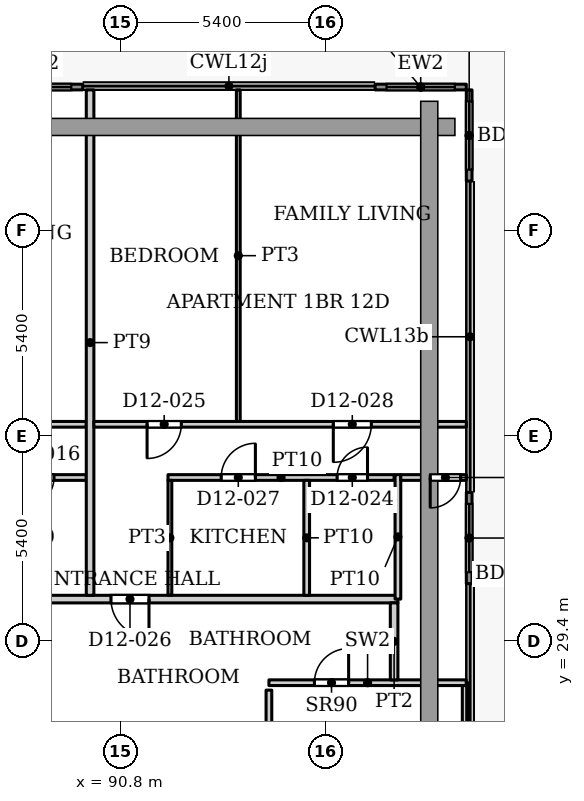
"""IFC4 building model, lengths in metres.
Left out: names, types, materials, properties, quantities, classifications, styles, units other than length and angle.
Written with IfcOpenShell. Run it as: python <this file> out.ifc"""

import sys

from ifc_helpers import new_model, si_unit, direction, frame, frame_2d, origin, place, context, subcontext, project, spatial, rectangle, extrude, source, transform, mapped, element, fill, save


model = new_model("IFC4")
c1 = context("Model", 3, precision=1e-05, world=origin(), true_north=direction((0.0, 1.0)))
c2 = subcontext(c1, "Body", "Model", "MODEL_VIEW")
j1 = project(units=[si_unit("LENGTHUNIT", "METRE"), si_unit("PLANEANGLEUNIT", "RADIAN")], contexts=[c1])
p1 = place(None, origin())
s1 = spatial("IfcSite", under=j1, at=p1, CompositionType="ELEMENT")
p2 = place(p1, origin())
s2 = spatial("IfcBuilding", under=s1, at=p2, CompositionType="ELEMENT")
p3 = place(p2, frame((0.0, 0.0, 53.9)))
s3 = spatial("IfcBuildingStorey", under=s2, at=p3, CompositionType="ELEMENT", Elevation=53.9)
p4 = place(p3, frame((87.406, 43.975, 0.0), z_axis=(0.0, 0.0, 1.0), x_axis=(1.0, 0.0, 0.0)))
e1 = element("IfcWall", 1, at=p4, inside=s3, PredefinedType="SOLIDWALL", context=c2, shape_type="SweptSolid", body=[
    extrude(rectangle(XDim=2.4, YDim=0.15, at=frame_2d((1.2, 0.0))), origin(), (0.0, 0.0, 1.0), 3.75),
])
p5 = place(p4, frame((0.3, 0.0, 0.0)))
e2 = element("IfcOpeningElement", 2, at=p5, cuts=e1, PredefinedType="OPENING", context=c2, shape_type="SweptSolid", body=[
    extrude(rectangle(XDim=1.8, YDim=2.4, at=frame_2d((0.9, 1.2))), frame((0.0, 0.085, 0.0), z_axis=(0.0, -1.0, 0.0), x_axis=(1.0, 0.0, 0.0)), (0.0, 0.0, 1.0), 0.17),
])
p6 = place(p3, frame((97.5, 43.975, 0.0), z_axis=(0.0, 0.0, 1.0), x_axis=(1.0, 0.0, 0.0)))
e3 = element("IfcWall", 3, at=p6, inside=s3, PredefinedType="SOLIDWALL", context=c2, shape_type="SweptSolid", body=[
    extrude(rectangle(XDim=2.4, YDim=0.15, at=frame_2d((1.2, 0.0))), origin(), (0.0, 0.0, 1.0), 3.75),
])
p7 = place(p6, frame((0.3, 0.0, 0.0)))
e4 = element("IfcOpeningElement", 4, at=p7, cuts=e3, PredefinedType="OPENING", context=c2, shape_type="SweptSolid", body=[
    extrude(rectangle(XDim=1.8, YDim=2.4, at=frame_2d((0.9, 1.2))), frame((0.0, 0.085, 0.0), z_axis=(0.0, -1.0, 0.0), x_axis=(1.0, 0.0, 0.0)), (0.0, 0.0, 1.0), 0.17),
])
p8 = place(p3, frame((99.975, 43.9, 0.0), z_axis=(0.0, 0.0, 1.0), x_axis=(0.0, -1.0, 0.0)))
e5 = element("IfcWall", 5, at=p8, inside=s3, PredefinedType="SOLIDWALL", context=c2, shape_type="SweptSolid", body=[
    extrude(rectangle(XDim=2.4, YDim=0.15, at=frame_2d((1.2, 0.0))), origin(), (0.0, 0.0, 1.0), 3.75),
])
p9 = place(p8, frame((0.3, 0.0, 0.0)))
e6 = element("IfcOpeningElement", 6, at=p9, cuts=e5, PredefinedType="OPENING", context=c2, shape_type="SweptSolid", body=[
    extrude(rectangle(XDim=1.8, YDim=2.4, at=frame_2d((0.9, 1.2))), frame((0.0, 0.085, 0.0), z_axis=(0.0, -1.0, 0.0), x_axis=(1.0, 0.0, 0.0)), (0.0, 0.0, 1.0), 0.17),
])
p10 = place(p3, frame((99.975, 33.307, 0.0), z_axis=(0.0, 0.0, 1.0), x_axis=(0.0, -1.0, 0.0)))
e7 = element("IfcWall", 7, at=p10, inside=s3, PredefinedType="SOLIDWALL", context=c2, shape_type="SweptSolid", body=[
    extrude(rectangle(XDim=2.4, YDim=0.15, at=frame_2d((1.2, 0.0))), origin(), (0.0, 0.0, 1.0), 3.75),
])
p11 = place(p10, frame((0.3, 0.0, 0.0)))
e8 = element("IfcOpeningElement", 8, at=p11, cuts=e7, PredefinedType="OPENING", context=c2, shape_type="SweptSolid", body=[
    extrude(rectangle(XDim=1.8, YDim=2.4, at=frame_2d((0.9, 1.2))), frame((0.0, 0.085, 0.0), z_axis=(0.0, -1.0, 0.0), x_axis=(1.0, 0.0, 0.0)), (0.0, 0.0, 1.0), 0.17),
])
p12 = place(p3, frame((99.87, 21.015, 0.0), z_axis=(0.0, 0.0, 1.0), x_axis=(0.0, 1.0, 0.0)))
e9 = element("IfcWall", 9, at=p12, inside=s3, PredefinedType="PARTITIONING", context=c2, shape_type="SweptSolid", body=[
    extrude(rectangle(XDim=7.285, YDim=0.15, at=frame_2d((3.643, 0.0))), origin(), (0.0, 0.0, 1.0), 3.9),
])
p13 = place(p3, frame((94.706, 28.3, 0.0), z_axis=(0.0, 0.0, 1.0), x_axis=(1.0, 0.0, 0.0)))
e10 = element("IfcWall", 10, at=p13, inside=s3, PredefinedType="PARTITIONING", context=c2, shape_type="SweptSolid", body=[
    extrude(rectangle(XDim=5.192, YDim=0.15, at=frame_2d((2.596, 0.0))), origin(), (0.0, 0.0, 1.0), 3.9),
])
p14 = place(p13, frame((1.197, 0.0, 0.0)))
e11 = element("IfcOpeningElement", 11, at=p14, cuts=e10, PredefinedType="OPENING", context=c2, shape_type="SweptSolid", body=[
    extrude(rectangle(XDim=0.9, YDim=2.2, at=frame_2d((0.45, 1.1))), frame((0.0, 0.085, 0.0), z_axis=(0.0, -1.0, 0.0), x_axis=(1.0, 0.0, 0.0)), (0.0, 0.0, 1.0), 0.17),
])
p15 = place(p3, frame((94.706, 21.287, 0.0), z_axis=(0.0, 0.0, 1.0), x_axis=(0.0, 1.0, 0.0)))
e12 = element("IfcWall", 12, at=p15, inside=s3, PredefinedType="PARTITIONING", context=c2, shape_type="SweptSolid", body=[
    extrude(rectangle(XDim=6.818, YDim=0.15, at=frame_2d((3.409, 0.0))), origin(), (0.0, 0.0, 1.0), 3.9),
])
p16 = place(p3, frame((55.9, 30.5, 0.0), z_axis=(0.0, 0.0, 1.0), x_axis=(1.0, 0.0, 0.0)))
e13 = element("IfcWall", 13, at=p16, inside=s3, PredefinedType="PARTITIONING", context=c2, shape_type="SweptSolid", body=[
    extrude(rectangle(XDim=42.2, YDim=0.2, at=frame_2d((21.1, 0.0))), origin(), (0.0, 0.0, 1.0), 3.6),
])
p17 = place(p16, frame((0.6, 0.0, 0.0)))
e14 = element("IfcOpeningElement", 14, at=p17, cuts=e13, PredefinedType="OPENING", context=c2, shape_type="SweptSolid", body=[
    extrude(rectangle(XDim=1.0, YDim=2.1, at=frame_2d((0.5, 1.05))), frame((0.0, 0.11, 0.0), z_axis=(0.0, -1.0, 0.0), x_axis=(1.0, 0.0, 0.0)), (0.0, 0.0, 1.0), 0.22),
])
p18 = place(p16, frame((13.2, 0.0, 0.0)))
e15 = element("IfcOpeningElement", 15, at=p18, cuts=e13, PredefinedType="OPENING", context=c2, shape_type="SweptSolid", body=[
    extrude(rectangle(XDim=1.0, YDim=2.1, at=frame_2d((0.5, 1.05))), frame((0.0, 0.11, 0.0), z_axis=(0.0, -1.0, 0.0), x_axis=(1.0, 0.0, 0.0)), (0.0, 0.0, 1.0), 0.22),
])
p19 = place(p16, frame((22.8, 0.0, 0.0)))
e16 = element("IfcOpeningElement", 16, at=p19, cuts=e13, PredefinedType="OPENING", context=c2, shape_type="SweptSolid", body=[
    extrude(rectangle(XDim=1.0, YDim=2.1, at=frame_2d((0.5, 1.05))), frame((0.0, 0.11, 0.0), z_axis=(0.0, -1.0, 0.0), x_axis=(1.0, 0.0, 0.0)), (0.0, 0.0, 1.0), 0.22),
])
p20 = place(p16, frame((34.65, 0.0, 0.0)))
e17 = element("IfcOpeningElement", 17, at=p20, cuts=e13, PredefinedType="OPENING", context=c2, shape_type="SweptSolid", body=[
    extrude(rectangle(XDim=1.0, YDim=2.1, at=frame_2d((0.5, 1.05))), frame((0.0, 0.11, 0.0), z_axis=(0.0, -1.0, 0.0), x_axis=(1.0, 0.0, 0.0)), (0.0, 0.0, 1.0), 0.22),
])
p21 = place(p3, frame((78.1, 35.1, 0.0), z_axis=(0.0, 0.0, 1.0), x_axis=(1.0, 0.0, 0.0)))
e18 = element("IfcWall", 18, at=p21, inside=s3, PredefinedType="PARTITIONING", context=c2, shape_type="SweptSolid", body=[
    extrude(rectangle(XDim=11.8, YDim=0.15, at=frame_2d((5.9, 0.0))), origin(), (0.0, 0.0, 1.0), 3.6),
])
p22 = place(p21, frame((0.65, 0.0, 0.0)))
e19 = element("IfcOpeningElement", 19, at=p22, cuts=e18, PredefinedType="OPENING", context=c2, shape_type="SweptSolid", body=[
    extrude(rectangle(XDim=0.9, YDim=2.1, at=frame_2d((0.45, 1.05))), frame((0.0, 0.085, 0.0), z_axis=(0.0, -1.0, 0.0), x_axis=(1.0, 0.0, 0.0)), (0.0, 0.0, 1.0), 0.17),
])
p23 = place(p21, frame((8.85, 0.0, 0.0)))
e20 = element("IfcOpeningElement", 20, at=p23, cuts=e18, PredefinedType="OPENING", context=c2, shape_type="SweptSolid", body=[
    extrude(rectangle(XDim=1.0, YDim=2.1, at=frame_2d((0.5, 1.05))), frame((0.0, 0.085, 0.0), z_axis=(0.0, -1.0, 0.0), x_axis=(1.0, 0.0, 0.0)), (0.0, 0.0, 1.0), 0.17),
])
p24 = place(p21, frame((5.15, 0.0, 0.0)))
e21 = element("IfcOpeningElement", 21, at=p24, cuts=e18, PredefinedType="OPENING", context=c2, shape_type="SweptSolid", body=[
    extrude(rectangle(XDim=0.9, YDim=2.1, at=frame_2d((0.45, 1.05))), frame((0.0, 0.085, 0.0), z_axis=(0.0, -1.0, 0.0), x_axis=(1.0, 0.0, 0.0)), (0.0, 0.0, 1.0), 0.17),
])
p25 = place(p3, frame((80.95, 33.7, 0.0), z_axis=(0.0, 0.0, 1.0), x_axis=(1.0, 0.0, 0.0)))
e22 = element("IfcWall", 22, at=p25, inside=s3, PredefinedType="PARTITIONING", context=c2, shape_type="SweptSolid", body=[
    extrude(rectangle(XDim=8.95, YDim=0.15, at=frame_2d((4.475, 0.0))), origin(), (0.0, 0.0, 1.0), 3.6),
])
p26 = place(p25, frame((7.3, 0.0, 0.0)))
e23 = element("IfcOpeningElement", 23, at=p26, cuts=e22, PredefinedType="OPENING", context=c2, shape_type="SweptSolid", body=[
    extrude(rectangle(XDim=0.8, YDim=2.1, at=frame_2d((0.4, 1.05))), frame((0.0, 0.085, 0.0), z_axis=(0.0, -1.0, 0.0), x_axis=(1.0, 0.0, 0.0)), (0.0, 0.0, 1.0), 0.17),
])
p27 = place(p25, frame((1.6, 0.0, 0.0)))
e24 = element("IfcOpeningElement", 24, at=p27, cuts=e22, PredefinedType="OPENING", context=c2, shape_type="SweptSolid", body=[
    extrude(rectangle(XDim=0.9, YDim=2.1, at=frame_2d((0.45, 1.05))), frame((0.0, 0.085, 0.0), z_axis=(0.0, -1.0, 0.0), x_axis=(1.0, 0.0, 0.0)), (0.0, 0.0, 1.0), 0.17),
])
p28 = place(p25, frame((4.9, 0.0, 0.0)))
e25 = element("IfcOpeningElement", 25, at=p28, cuts=e22, PredefinedType="OPENING", context=c2, shape_type="SweptSolid", body=[
    extrude(rectangle(XDim=0.8, YDim=2.1, at=frame_2d((0.4, 1.05))), frame((0.0, 0.085, 0.0), z_axis=(0.0, -1.0, 0.0), x_axis=(1.0, 0.0, 0.0)), (0.0, 0.0, 1.0), 0.17),
])
p29 = place(p3, frame((90.0, 30.6, 0.0), z_axis=(0.0, 0.0, 1.0), x_axis=(0.0, 1.0, 0.0)))
e26 = element("IfcWall", 26, at=p29, inside=s3, PredefinedType="PARTITIONING", context=c2, shape_type="SweptSolid", body=[
    extrude(rectangle(XDim=13.3, YDim=0.2, at=frame_2d((6.65, 0.0))), origin(), (0.0, 0.0, 1.0), 3.6),
])
p30 = place(p3, frame((90.1, 35.1, 0.0), z_axis=(0.0, 0.0, 1.0), x_axis=(1.0, 0.0, 0.0)))
e27 = element("IfcWall", 27, at=p30, inside=s3, PredefinedType="PARTITIONING", context=c2, shape_type="SweptSolid", body=[
    extrude(rectangle(XDim=9.8, YDim=0.15, at=frame_2d((4.9, 0.0))), origin(), (0.0, 0.0, 1.0), 3.6),
])
p31 = place(p30, frame((1.4, 0.0, 0.0)))
e28 = element("IfcOpeningElement", 28, at=p31, cuts=e27, PredefinedType="OPENING", context=c2, shape_type="SweptSolid", body=[
    extrude(rectangle(XDim=0.9, YDim=2.1, at=frame_2d((0.45, 1.05))), frame((0.0, 0.085, 0.0), z_axis=(0.0, -1.0, 0.0), x_axis=(1.0, 0.0, 0.0)), (0.0, 0.0, 1.0), 0.17),
])
p32 = place(p30, frame((6.3, 0.0, 0.0)))
e29 = element("IfcOpeningElement", 29, at=p32, cuts=e27, PredefinedType="OPENING", context=c2, shape_type="SweptSolid", body=[
    extrude(rectangle(XDim=1.0, YDim=2.1, at=frame_2d((0.5, 1.05))), frame((0.0, 0.085, 0.0), z_axis=(0.0, -1.0, 0.0), x_axis=(1.0, 0.0, 0.0)), (0.0, 0.0, 1.0), 0.17),
])
p33 = place(p3, frame((92.05, 33.7, 0.0), z_axis=(0.0, 0.0, 1.0), x_axis=(1.0, 0.0, 0.0)))
e30 = element("IfcWall", 30, at=p33, inside=s3, PredefinedType="PARTITIONING", context=c2, shape_type="SweptSolid", body=[
    extrude(rectangle(XDim=5.95, YDim=0.15, at=frame_2d((2.975, 0.0))), origin(), (0.0, 0.0, 1.0), 3.6),
])
p34 = place(p33, frame((4.45, 0.0, 0.0)))
e31 = element("IfcOpeningElement", 31, at=p34, cuts=e30, PredefinedType="OPENING", context=c2, shape_type="SweptSolid", body=[
    extrude(rectangle(XDim=0.8, YDim=2.1, at=frame_2d((0.4, 1.05))), frame((0.0, 0.085, 0.0), z_axis=(0.0, -1.0, 0.0), x_axis=(1.0, 0.0, 0.0)), (0.0, 0.0, 1.0), 0.17),
])
p35 = place(p33, frame((1.4, 0.0, 0.0)))
e32 = element("IfcOpeningElement", 32, at=p35, cuts=e30, PredefinedType="OPENING", context=c2, shape_type="SweptSolid", body=[
    extrude(rectangle(XDim=0.9, YDim=2.1, at=frame_2d((0.45, 1.05))), frame((0.0, 0.085, 0.0), z_axis=(0.0, -1.0, 0.0), x_axis=(1.0, 0.0, 0.0)), (0.0, 0.0, 1.0), 0.17),
])
p36 = place(p3, frame((92.1, 30.6, 0.0), z_axis=(0.0, 0.0, 1.0), x_axis=(0.0, 1.0, 0.0)))
e33 = element("IfcWall", 33, at=p36, inside=s3, PredefinedType="PARTITIONING", context=c2, shape_type="SweptSolid", body=[
    extrude(rectangle(XDim=3.025, YDim=0.1, at=frame_2d((1.512, 0.0))), origin(), (0.0, 0.0, 1.0), 3.6),
])
p37 = place(p3, frame((93.9, 35.175, 0.0), z_axis=(0.0, 0.0, 1.0), x_axis=(0.0, 1.0, 0.0)))
e34 = element("IfcWall", 34, at=p37, inside=s3, PredefinedType="PARTITIONING", context=c2, shape_type="SweptSolid", body=[
    extrude(rectangle(XDim=8.725, YDim=0.1, at=frame_2d((4.362, 0.0))), origin(), (0.0, 0.0, 1.0), 3.6),
])
p38 = place(p3, frame((95.7, 30.6, 0.0), z_axis=(0.0, 0.0, 1.0), x_axis=(0.0, 1.0, 0.0)))
e35 = element("IfcWall", 35, at=p38, inside=s3, PredefinedType="PARTITIONING", context=c2, shape_type="SweptSolid", body=[
    extrude(rectangle(XDim=3.025, YDim=0.15, at=frame_2d((1.512, 0.0))), origin(), (0.0, 0.0, 1.0), 3.6),
])
p39 = place(p3, frame((98.0, 28.374, 0.0), z_axis=(0.0, 0.0, 1.0), x_axis=(0.0, 1.0, 0.0)))
e36 = element("IfcWall", 36, at=p39, inside=s3, PredefinedType="PARTITIONING", context=c2, shape_type="SweptSolid", body=[
    extrude(rectangle(XDim=2.026, YDim=0.2, at=frame_2d((1.013, 0.0))), origin(), (0.0, 0.0, 1.0), 3.6),
])
p40 = place(p3, frame((98.1, 30.5, 0.0), z_axis=(0.0, 0.0, 1.0), x_axis=(0.0, 1.0, 0.0)))
e37 = element("IfcWall", 37, at=p40, inside=s3, PredefinedType="PARTITIONING", context=c2, shape_type="SweptSolid", body=[
    extrude(rectangle(XDim=3.275, YDim=0.15, at=frame_2d((1.637, 0.0))), origin(), (0.0, 0.0, 1.0), 3.6),
])
p41 = place(p3, frame((98.175, 33.7, 0.0), z_axis=(0.0, 0.0, 1.0), x_axis=(1.0, 0.0, 0.0)))
e38 = element("IfcWall", 38, at=p41, inside=s3, PredefinedType="PARTITIONING", context=c2, shape_type="SweptSolid", body=[
    extrude(rectangle(XDim=1.725, YDim=0.15, at=frame_2d((0.862, 0.0))), origin(), (0.0, 0.0, 1.0), 3.6),
])
p42 = place(p41, frame((0.775, 0.0, 0.0)))
e39 = element("IfcOpeningElement", 39, at=p42, cuts=e38, PredefinedType="OPENING", context=c2, shape_type="SweptSolid", body=[
    extrude(rectangle(XDim=0.8, YDim=2.1, at=frame_2d((0.4, 1.05))), frame((0.0, 0.085, 0.0), z_axis=(0.0, -1.0, 0.0), x_axis=(1.0, 0.0, 0.0)), (0.0, 0.0, 1.0), 0.17),
])
m1 = source(origin(), c2, "Body", "SweptSolid", [
    extrude(rectangle(XDim=1.8, YDim=2.4, at=frame_2d((0.9, 1.2))), frame((0.0, 0.025, 0.0), z_axis=(0.0, -1.0, 0.0), x_axis=(1.0, 0.0, 0.0)), (0.0, 0.0, 1.0), 0.05),
])
p43 = place(p5, origin())
e40 = element("IfcDoor", 40, at=p43, inside=s3, OperationType="SLIDING_TO_LEFT", PredefinedType="DOOR", context=c2, shape_type="MappedRepresentation", body=[
    mapped(m1, transform((0.0, 0.0, 0.0), x_axis=(1.0, 0.0, 0.0), y_axis=(0.0, 1.0, 0.0), z_axis=(0.0, 0.0, 1.0), scale=1.0)),
])
fill(e2, e40)
p44 = place(p7, origin())
e41 = element("IfcDoor", 41, at=p44, inside=s3, OperationType="SLIDING_TO_LEFT", PredefinedType="DOOR", context=c2, shape_type="MappedRepresentation", body=[
    mapped(m1, transform((0.0, 0.0, 0.0), x_axis=(1.0, 0.0, 0.0), y_axis=(0.0, 1.0, 0.0), z_axis=(0.0, 0.0, 1.0), scale=1.0)),
])
fill(e4, e41)
p45 = place(p9, origin())
e42 = element("IfcDoor", 42, at=p45, inside=s3, OperationType="SLIDING_TO_LEFT", PredefinedType="DOOR", context=c2, shape_type="MappedRepresentation", body=[
    mapped(m1, transform((0.0, 0.0, 0.0), x_axis=(1.0, 0.0, 0.0), y_axis=(0.0, 1.0, 0.0), z_axis=(0.0, 0.0, 1.0), scale=1.0)),
])
fill(e6, e42)
p46 = place(p11, origin())
e43 = element("IfcDoor", 43, at=p46, inside=s3, OperationType="SLIDING_TO_LEFT", PredefinedType="DOOR", context=c2, shape_type="MappedRepresentation", body=[
    mapped(m1, transform((0.0, 0.0, 0.0), x_axis=(1.0, 0.0, 0.0), y_axis=(0.0, 1.0, 0.0), z_axis=(0.0, 0.0, 1.0), scale=1.0)),
])
fill(e8, e43)
m2 = source(origin(), c2, "Body", "SweptSolid", [
    extrude(rectangle(XDim=0.9, YDim=2.2, at=frame_2d((0.45, 1.1))), frame((0.0, 0.025, 0.0), z_axis=(0.0, -1.0, 0.0), x_axis=(1.0, 0.0, 0.0)), (0.0, 0.0, 1.0), 0.05),
])
p47 = place(p14, origin())
e44 = element("IfcDoor", 44, at=p47, inside=s3, OperationType="SINGLE_SWING_LEFT", PredefinedType="DOOR", context=c2, shape_type="MappedRepresentation", body=[
    mapped(m2, transform((0.0, 0.0, 0.0), x_axis=(1.0, 0.0, 0.0), y_axis=(0.0, 1.0, 0.0), z_axis=(0.0, 0.0, 1.0), scale=1.0)),
])
fill(e11, e44)
m3 = source(origin(), c2, "Body", "SweptSolid", [
    extrude(rectangle(XDim=0.8, YDim=2.1, at=frame_2d((0.4, 1.05))), frame((0.0, 0.025, 0.0), z_axis=(0.0, -1.0, 0.0), x_axis=(1.0, 0.0, 0.0)), (0.0, 0.0, 1.0), 0.05),
])
p48 = place(p26, origin())
e45 = element("IfcDoor", 45, at=p48, inside=s3, OperationType="SINGLE_SWING_RIGHT", PredefinedType="DOOR", context=c2, shape_type="MappedRepresentation", body=[
    mapped(m3, transform((0.0, 0.0, 0.0), x_axis=(1.0, 0.0, 0.0), y_axis=(0.0, 1.0, 0.0), z_axis=(0.0, 0.0, 1.0), scale=1.0)),
])
fill(e23, e45)
p49 = place(p34, origin())
e46 = element("IfcDoor", 46, at=p49, inside=s3, OperationType="SINGLE_SWING_LEFT", PredefinedType="DOOR", context=c2, shape_type="MappedRepresentation", body=[
    mapped(m3, transform((0.0, 0.0, 0.0), x_axis=(1.0, 0.0, 0.0), y_axis=(0.0, 1.0, 0.0), z_axis=(0.0, 0.0, 1.0), scale=1.0)),
])
fill(e31, e46)
m4 = source(origin(), c2, "Body", "SweptSolid", [
    extrude(rectangle(XDim=0.9, YDim=2.1, at=frame_2d((0.45, 1.05))), frame((0.0, 0.025, 0.0), z_axis=(0.0, -1.0, 0.0), x_axis=(1.0, 0.0, 0.0)), (0.0, 0.0, 1.0), 0.05),
])
p50 = place(p31, origin())
e47 = element("IfcDoor", 47, at=p50, inside=s3, OperationType="SINGLE_SWING_RIGHT", PredefinedType="DOOR", context=c2, shape_type="MappedRepresentation", body=[
    mapped(m4, transform((0.0, 0.0, 0.0), x_axis=(1.0, 0.0, 0.0), y_axis=(0.0, 1.0, 0.0), z_axis=(0.0, 0.0, 1.0), scale=1.0)),
])
fill(e28, e47)
m5 = source(origin(), c2, "Body", "SweptSolid", [
    extrude(rectangle(XDim=1.0, YDim=2.1, at=frame_2d((0.5, 1.05))), frame((0.0, 0.025, 0.0), z_axis=(0.0, -1.0, 0.0), x_axis=(1.0, 0.0, 0.0)), (0.0, 0.0, 1.0), 0.05),
])
p51 = place(p20, origin())
e48 = element("IfcDoor", 48, at=p51, inside=s3, OperationType="SINGLE_SWING_RIGHT", PredefinedType="DOOR", context=c2, shape_type="MappedRepresentation", body=[
    mapped(m5, transform((0.0, 0.0, 0.0), x_axis=(1.0, 0.0, 0.0), y_axis=(0.0, 1.0, 0.0), z_axis=(0.0, 0.0, 1.0), scale=1.0)),
])
fill(e17, e48)
p52 = place(p35, origin())
e49 = element("IfcDoor", 49, at=p52, inside=s3, OperationType="SINGLE_SWING_LEFT", PredefinedType="DOOR", context=c2, shape_type="MappedRepresentation", body=[
    mapped(m4, transform((0.0, 0.0, 0.0), x_axis=(1.0, 0.0, 0.0), y_axis=(0.0, 1.0, 0.0), z_axis=(0.0, 0.0, 1.0), scale=1.0)),
])
fill(e32, e49)
m6 = source(origin(), c2, "Body", "SweptSolid", [
    extrude(rectangle(XDim=1.0, YDim=2.1, at=frame_2d((0.5, 1.05))), frame((0.0, 0.025, 0.0), z_axis=(0.0, -1.0, 0.0), x_axis=(1.0, 0.0, 0.0)), (0.0, 0.0, 1.0), 0.05),
])
p53 = place(p32, origin())
e50 = element("IfcDoor", 50, at=p53, inside=s3, OperationType="SINGLE_SWING_RIGHT", PredefinedType="DOOR", context=c2, shape_type="MappedRepresentation", body=[
    mapped(m6, transform((0.0, 0.0, 0.0), x_axis=(1.0, 0.0, 0.0), y_axis=(0.0, 1.0, 0.0), z_axis=(0.0, 0.0, 1.0), scale=1.0)),
])
fill(e29, e50)
p54 = place(p42, origin())
e51 = element("IfcDoor", 51, at=p54, inside=s3, OperationType="SINGLE_SWING_RIGHT", PredefinedType="DOOR", context=c2, shape_type="MappedRepresentation", body=[
    mapped(m3, transform((0.0, 0.0, 0.0), x_axis=(1.0, 0.0, 0.0), y_axis=(0.0, 1.0, 0.0), z_axis=(0.0, 0.0, 1.0), scale=1.0)),
])
fill(e39, e51)
save(model, sys.argv[1])
